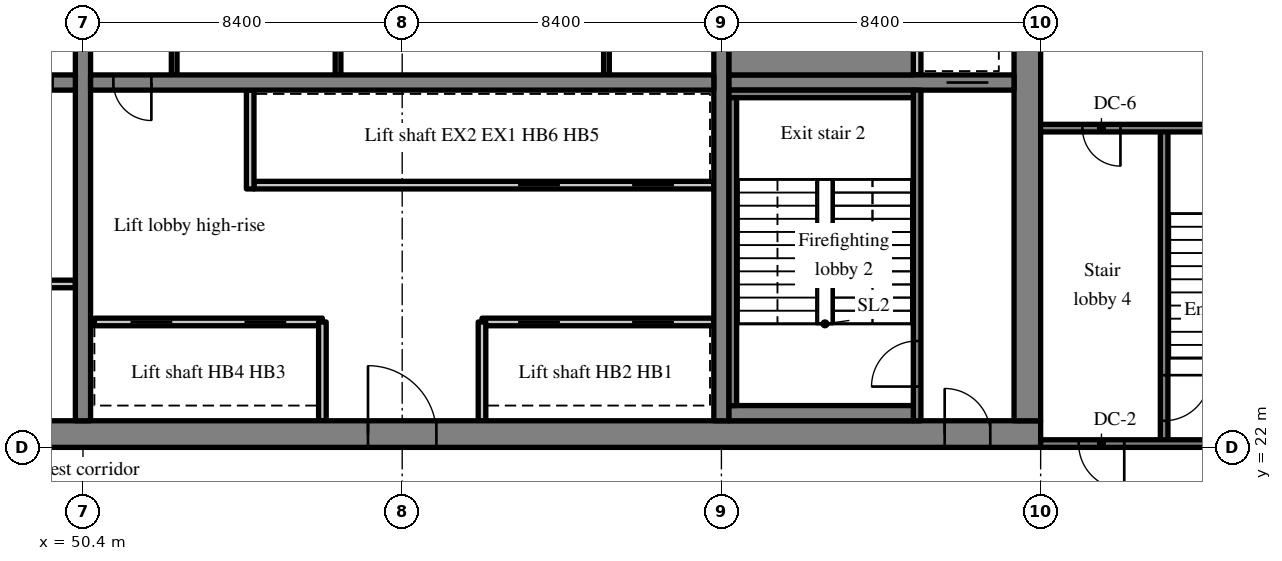
"""IFC4 building model, lengths in metres.
Left out: names, types, materials, properties, quantities, classifications, styles, units other than length and angle.
Written with IfcOpenShell. Run it as: python <this file> out.ifc"""

import sys

from ifc_helpers import new_model, si_unit, direction, frame, frame_2d, origin, place, context, subcontext, project, spatial, rectangle, extrude, source, transform, mapped, element, fill, save


model = new_model("IFC4")
c1 = context("Model", 3, precision=1e-05, world=origin(), true_north=direction((0.0, 1.0)))
c2 = subcontext(c1, "Body", "Model", "MODEL_VIEW")
j1 = project(units=[si_unit("LENGTHUNIT", "METRE"), si_unit("PLANEANGLEUNIT", "RADIAN")], contexts=[c1])
p1 = place(None, origin())
s1 = spatial("IfcSite", under=j1, at=p1, CompositionType="ELEMENT")
p2 = place(p1, origin())
s2 = spatial("IfcBuilding", under=s1, at=p2, CompositionType="ELEMENT")
p3 = place(p2, frame((0.0, 0.0, 163.0)))
s3 = spatial("IfcBuildingStorey", under=s2, at=p3, CompositionType="ELEMENT", Elevation=163.0)
m1 = source(origin(), c2, "Body", "SweptSolid", [
    extrude(rectangle(XDim=50.4, YDim=0.7, at=frame_2d((25.2, 0.0))), origin(), (0.0, 0.0, 1.0), 3.52),
])
p4 = place(p3, frame((25.2, 22.35, 0.0), z_axis=(0.0, 0.0, 1.0), x_axis=(1.0, 0.0, 0.0)))
e1 = element("IfcWall", 1, at=p4, inside=s3, PredefinedType="SHEAR", context=c2, shape_type="MappedRepresentation", body=[
    mapped(m1, transform((0.0, 0.0, 0.0), scale=1.0)),
])
m2 = source(origin(), c2, "Body", "SweptSolid", [
    extrude(rectangle(XDim=1.8, YDim=2.1, at=frame_2d((0.9, 1.05))), frame((0.0, 0.36, 0.0), z_axis=(0.0, -1.0, 0.0), x_axis=(1.0, 0.0, 0.0)), (0.0, 0.0, 1.0), 0.72),
])
p5 = place(p4, frame((15.9, 0.0, 0.0)))
e2 = element("IfcOpeningElement", 2, at=p5, cuts=e1, PredefinedType="OPENING", context=c2, shape_type="MappedRepresentation", body=[
    mapped(m2, transform((0.0, 0.0, 0.0), scale=1.0)),
])
m3 = source(origin(), c2, "Body", "SweptSolid", [
    extrude(rectangle(XDim=0.9, YDim=2.1, at=frame_2d((0.45, 1.05))), frame((0.0, 0.36, 0.0), z_axis=(0.0, -1.0, 0.0), x_axis=(1.0, 0.0, 0.0)), (0.0, 0.0, 1.0), 0.72),
])
p6 = place(p4, frame((9.7, 0.0, 0.0)))
e3 = element("IfcOpeningElement", 3, at=p6, cuts=e1, PredefinedType="OPENING", context=c2, shape_type="MappedRepresentation", body=[
    mapped(m3, transform((0.0, 0.0, 0.0), scale=1.0)),
])
p7 = place(p4, frame((21.5, 0.0, 0.0)))
e4 = element("IfcOpeningElement", 4, at=p7, cuts=e1, PredefinedType="OPENING", context=c2, shape_type="MappedRepresentation", body=[
    mapped(m3, transform((0.0, 0.0, 0.0), scale=1.0)),
])
p8 = place(p4, frame((32.7, 0.0, 0.0)))
e5 = element("IfcOpeningElement", 5, at=p8, cuts=e1, PredefinedType="OPENING", context=c2, shape_type="MappedRepresentation", body=[
    mapped(m2, transform((0.0, 0.0, 0.0), scale=1.0)),
])
m4 = source(origin(), c2, "Body", "SweptSolid", [
    extrude(rectangle(XDim=1.2, YDim=2.1, at=frame_2d((0.6, 1.05))), frame((0.0, 0.36, 0.0), z_axis=(0.0, -1.0, 0.0), x_axis=(1.0, 0.0, 0.0)), (0.0, 0.0, 1.0), 0.72),
])
p9 = place(p4, frame((6.475, 0.0, 0.0)))
e6 = element("IfcOpeningElement", 6, at=p9, cuts=e1, PredefinedType="OPENING", context=c2, shape_type="MappedRepresentation", body=[
    mapped(m4, transform((0.0, 0.0, 0.0), scale=1.0)),
])
p10 = place(p4, frame((47.875, 0.0, 0.0)))
e7 = element("IfcOpeningElement", 7, at=p10, cuts=e1, PredefinedType="OPENING", context=c2, shape_type="MappedRepresentation", body=[
    mapped(m4, transform((0.0, 0.0, 0.0), scale=1.0)),
])
m5 = source(origin(), c2, "Body", "SweptSolid", [
    extrude(rectangle(XDim=18.6, YDim=0.7, at=frame_2d((9.3, 0.0))), origin(), (0.0, 0.0, 1.0), 3.52),
])
p11 = place(p3, frame((75.25, 22.7, 0.0), z_axis=(0.0, 0.0, 1.0), x_axis=(0.0, 1.0, 0.0)))
e8 = element("IfcWall", 8, at=p11, inside=s3, PredefinedType="SHEAR", context=c2, shape_type="MappedRepresentation", body=[
    mapped(m5, transform((0.0, 0.0, 0.0), scale=1.0)),
])
p12 = place(p11, frame((12.7, 0.0, 0.0)))
e9 = element("IfcOpeningElement", 9, at=p12, cuts=e8, PredefinedType="OPENING", context=c2, shape_type="MappedRepresentation", body=[
    mapped(m4, transform((0.0, 0.0, 0.0), scale=1.0)),
])
m6 = source(origin(), c2, "Body", "SweptSolid", [
    extrude(rectangle(XDim=18.6, YDim=0.4, at=frame_2d((9.3, 0.0))), origin(), (0.0, 0.0, 1.0), 3.52),
])
p13 = place(p3, frame((50.4, 22.7, 0.0), z_axis=(0.0, 0.0, 1.0), x_axis=(0.0, 1.0, 0.0)))
e10 = element("IfcWall", 10, at=p13, inside=s3, PredefinedType="SHEAR", context=c2, shape_type="MappedRepresentation", body=[
    mapped(m6, transform((0.0, 0.0, 0.0), scale=1.0)),
])
m7 = source(origin(), c2, "Body", "SweptSolid", [
    extrude(rectangle(XDim=1.1, YDim=2.1, at=frame_2d((0.55, 1.05))), frame((0.0, 0.21, 0.0), z_axis=(0.0, -1.0, 0.0), x_axis=(1.0, 0.0, 0.0)), (0.0, 0.0, 1.0), 0.42),
])
p14 = place(p13, frame((12.75, 0.0, 0.0)))
e11 = element("IfcOpeningElement", 11, at=p14, cuts=e10, PredefinedType="OPENING", context=c2, shape_type="MappedRepresentation", body=[
    mapped(m7, transform((0.0, 0.0, 0.0), scale=1.0)),
])
p15 = place(p3, frame((67.2, 22.7, 0.0), z_axis=(0.0, 0.0, 1.0), x_axis=(0.0, 1.0, 0.0)))
e12 = element("IfcWall", 12, at=p15, inside=s3, PredefinedType="SHEAR", context=c2, shape_type="MappedRepresentation", body=[
    mapped(m6, transform((0.0, 0.0, 0.0), scale=1.0)),
])
m8 = source(origin(), c2, "Body", "SweptSolid", [
    extrude(rectangle(XDim=16.4, YDim=0.4, at=frame_2d((8.2, 0.0))), origin(), (0.0, 0.0, 1.0), 3.52),
])
p16 = place(p3, frame((33.8, 31.6, 0.0), z_axis=(0.0, 0.0, 1.0), x_axis=(1.0, 0.0, 0.0)))
e13 = element("IfcWall", 13, at=p16, inside=s3, PredefinedType="SHEAR", context=c2, shape_type="MappedRepresentation", body=[
    mapped(m8, transform((0.0, 0.0, 0.0), scale=1.0)),
])
m9 = source(origin(), c2, "Body", "SweptSolid", [
    extrude(rectangle(XDim=1.0, YDim=2.1, at=frame_2d((0.5, 1.05))), frame((0.0, 0.21, 0.0), z_axis=(0.0, -1.0, 0.0), x_axis=(1.0, 0.0, 0.0)), (0.0, 0.0, 1.0), 0.42),
])
p17 = place(p16, frame((14.8, 0.0, 0.0)))
e14 = element("IfcOpeningElement", 14, at=p17, cuts=e13, PredefinedType="OPENING", context=c2, shape_type="MappedRepresentation", body=[
    mapped(m9, transform((0.0, 0.0, 0.0), scale=1.0)),
])
p18 = place(p3, frame((50.6, 31.6, 0.0), z_axis=(0.0, 0.0, 1.0), x_axis=(1.0, 0.0, 0.0)))
e15 = element("IfcWall", 15, at=p18, inside=s3, PredefinedType="SHEAR", context=c2, shape_type="MappedRepresentation", body=[
    mapped(m8, transform((0.0, 0.0, 0.0), scale=1.0)),
])
p19 = place(p18, frame((0.6, 0.0, 0.0)))
e16 = element("IfcOpeningElement", 16, at=p19, cuts=e15, PredefinedType="OPENING", context=c2, shape_type="MappedRepresentation", body=[
    mapped(m9, transform((0.0, 0.0, 0.0), scale=1.0)),
])
m10 = source(origin(), c2, "Body", "SweptSolid", [
    extrude(rectangle(XDim=7.5, YDim=0.4, at=frame_2d((3.75, 0.0))), origin(), (0.0, 0.0, 1.0), 3.52),
])
p20 = place(p3, frame((67.4, 31.6, 0.0), z_axis=(0.0, 0.0, 1.0), x_axis=(1.0, 0.0, 0.0)))
e17 = element("IfcWall", 17, at=p20, inside=s3, PredefinedType="SHEAR", context=c2, shape_type="MappedRepresentation", body=[
    mapped(m10, transform((0.0, 0.0, 0.0), scale=1.0)),
])
p21 = place(p20, frame((5.725, 0.0, 0.0)))
e18 = element("IfcOpeningElement", 18, at=p21, cuts=e17, PredefinedType="OPENING", context=c2, shape_type="MappedRepresentation", body=[
    mapped(m7, transform((0.0, 0.0, 0.0), scale=1.0)),
])
m11 = source(origin(), c2, "Body", "SweptSolid", [
    extrude(rectangle(XDim=6.1, YDim=0.2, at=frame_2d((3.05, 0.0))), origin(), (0.0, 0.0, 1.0), 3.52),
])
p22 = place(p3, frame((44.1, 26.3, 0.0), z_axis=(0.0, 0.0, 1.0), x_axis=(1.0, 0.0, 0.0)))
e19 = element("IfcWall", 19, at=p22, inside=s3, PredefinedType="PARTITIONING", context=c2, shape_type="MappedRepresentation", body=[
    mapped(m11, transform((0.0, 0.0, 0.0), scale=1.0)),
])
m12 = source(origin(), c2, "Body", "SweptSolid", [
    extrude(rectangle(XDim=6.1, YDim=0.2, at=frame_2d((3.05, 0.0))), origin(), (0.0, 0.0, 1.0), 3.52),
])
p23 = place(p3, frame((67.0, 25.3, 0.0), z_axis=(0.0, 0.0, 1.0), x_axis=(-1.0, 0.0, 0.0)))
e20 = element("IfcWall", 20, at=p23, inside=s3, PredefinedType="SOLIDWALL", context=c2, shape_type="MappedRepresentation", body=[
    mapped(m12, transform((0.0, 0.0, 0.0), scale=1.0)),
])
m13 = source(origin(), c2, "Body", "SweptSolid", [
    extrude(rectangle(XDim=1.1, YDim=2.1, at=frame_2d((0.55, 1.05))), frame((0.0, 0.11, 0.0), z_axis=(0.0, -1.0, 0.0), x_axis=(1.0, 0.0, 0.0)), (0.0, 0.0, 1.0), 0.22),
])
p24 = place(p23, frame((1.05, 0.0, 0.0)))
e21 = element("IfcOpeningElement", 21, at=p24, cuts=e20, PredefinedType="OPENING", context=c2, shape_type="MappedRepresentation", body=[
    mapped(m13, transform((0.0, 0.0, 0.0), scale=1.0)),
])
p25 = place(p23, frame((4.05, 0.0, 0.0)))
e22 = element("IfcOpeningElement", 22, at=p25, cuts=e20, PredefinedType="OPENING", context=c2, shape_type="MappedRepresentation", body=[
    mapped(m13, transform((0.0, 0.0, 0.0), scale=1.0)),
])
m14 = source(origin(), c2, "Body", "SweptSolid", [
    extrude(rectangle(XDim=6.0, YDim=0.2, at=frame_2d((3.0, 0.0))), origin(), (0.0, 0.0, 1.0), 3.52),
])
p26 = place(p3, frame((56.7, 25.3, 0.0), z_axis=(0.0, 0.0, 1.0), x_axis=(-1.0, 0.0, 0.0)))
e23 = element("IfcWall", 23, at=p26, inside=s3, PredefinedType="SOLIDWALL", context=c2, shape_type="MappedRepresentation", body=[
    mapped(m14, transform((0.0, 0.0, 0.0), scale=1.0)),
])
p27 = place(p26, frame((0.95, 0.0, 0.0)))
e24 = element("IfcOpeningElement", 24, at=p27, cuts=e23, PredefinedType="OPENING", context=c2, shape_type="MappedRepresentation", body=[
    mapped(m13, transform((0.0, 0.0, 0.0), scale=1.0)),
])
p28 = place(p26, frame((3.95, 0.0, 0.0)))
e25 = element("IfcOpeningElement", 25, at=p28, cuts=e23, PredefinedType="OPENING", context=c2, shape_type="MappedRepresentation", body=[
    mapped(m13, transform((0.0, 0.0, 0.0), scale=1.0)),
])
m15 = source(origin(), c2, "Body", "SweptSolid", [
    extrude(rectangle(XDim=12.1, YDim=0.2, at=frame_2d((6.05, 0.0))), origin(), (0.0, 0.0, 1.0), 3.52),
])
p29 = place(p3, frame((67.0, 28.9, 0.0), z_axis=(0.0, 0.0, 1.0), x_axis=(-1.0, 0.0, 0.0)))
e26 = element("IfcWall", 26, at=p29, inside=s3, PredefinedType="SOLIDWALL", context=c2, shape_type="MappedRepresentation", body=[
    mapped(m15, transform((0.0, 0.0, 0.0), scale=1.0)),
])
p30 = place(p29, frame((1.05, 0.0, 0.0)))
e27 = element("IfcOpeningElement", 27, at=p30, cuts=e26, PredefinedType="OPENING", context=c2, shape_type="MappedRepresentation", body=[
    mapped(m13, transform((0.0, 0.0, 0.0), scale=1.0)),
])
p31 = place(p29, frame((4.05, 0.0, 0.0)))
e28 = element("IfcOpeningElement", 28, at=p31, cuts=e26, PredefinedType="OPENING", context=c2, shape_type="MappedRepresentation", body=[
    mapped(m13, transform((0.0, 0.0, 0.0), scale=1.0)),
])
m16 = source(origin(), c2, "Body", "SweptSolid", [
    extrude(rectangle(XDim=2.6, YDim=0.2, at=frame_2d((1.3, 0.0))), origin(), (0.0, 0.0, 1.0), 3.52),
])
for number, where, z_axis, x_axis in (
    (29, (60.9, 22.7, 0.0), (0.0, 0.0, 1.0), (0.0, 1.0, 0.0)),
    (30, (56.7, 22.7, 0.0), (0.0, 0.0, 1.0), (0.0, 1.0, 0.0)),
):
    element("IfcWall", number, at=place(p3, frame(where, z_axis=z_axis, x_axis=x_axis)), inside=s3, PredefinedType="SOLIDWALL", context=c2, shape_type="MappedRepresentation", body=[
        mapped(m16, transform((0.0, 0.0, 0.0), scale=1.0)),
    ])
m17 = source(origin(), c2, "Body", "SweptSolid", [
    extrude(rectangle(XDim=2.6, YDim=0.2, at=frame_2d((1.3, 0.0))), origin(), (0.0, 0.0, 1.0), 3.52),
])
p32 = place(p3, frame((54.8, 28.8, 0.0), z_axis=(0.0, 0.0, 1.0), x_axis=(0.0, 1.0, 0.0)))
e31 = element("IfcWall", 31, at=p32, inside=s3, PredefinedType="SOLIDWALL", context=c2, shape_type="MappedRepresentation", body=[
    mapped(m17, transform((0.0, 0.0, 0.0), scale=1.0)),
])
m18 = source(origin(), c2, "Body", "SweptSolid", [
    extrude(rectangle(XDim=3.2, YDim=0.15, at=frame_2d((1.6, 0.0))), origin(), (0.0, 0.0, 1.0), 3.52),
])
for number, where, z_axis, x_axis in (
    (32, (52.8, 31.8, 0.0), (0.0, 0.0, 1.0), (0.0, 1.0, 0.0)),
    (33, (64.175, 31.8, 0.0), (0.0, 0.0, 1.0), (0.0, 1.0, 0.0)),
    (34, (57.112, 31.8, 0.0), (0.0, 0.0, 1.0), (0.0, 1.0, 0.0)),
):
    element("IfcWall", number, at=place(p3, frame(where, z_axis=z_axis, x_axis=x_axis)), inside=s3, PredefinedType="PARTITIONING", context=c2, shape_type="MappedRepresentation", body=[
        mapped(m18, transform((0.0, 0.0, 0.0), scale=1.0)),
    ])
m19 = source(origin(), c2, "Body", "SweptSolid", [
    extrude(rectangle(XDim=8.7, YDim=0.2, at=frame_2d((4.35, 0.0))), origin(), (0.0, 0.0, 1.0), 3.52),
])
p33 = place(p3, frame((72.35, 22.7, 0.0), z_axis=(0.0, 0.0, 1.0), x_axis=(0.0, 1.0, 0.0)))
e35 = element("IfcWall", 35, at=p33, inside=s3, PredefinedType="SOLIDWALL", context=c2, shape_type="MappedRepresentation", body=[
    mapped(m19, transform((0.0, 0.0, 0.0), scale=1.0)),
])
m20 = source(origin(), c2, "Body", "SweptSolid", [
    extrude(rectangle(XDim=1.2, YDim=2.1, at=frame_2d((0.6, 1.05))), frame((0.0, 0.11, 0.0), z_axis=(0.0, -1.0, 0.0), x_axis=(1.0, 0.0, 0.0)), (0.0, 0.0, 1.0), 0.22),
])
p34 = place(p33, frame((0.9, 0.0, 0.0)))
e36 = element("IfcOpeningElement", 36, at=p34, cuts=e35, PredefinedType="OPENING", context=c2, shape_type="MappedRepresentation", body=[
    mapped(m20, transform((0.0, 0.0, 0.0), scale=1.0)),
])
m21 = source(origin(), c2, "Body", "SweptSolid", [
    extrude(rectangle(XDim=1.8, YDim=0.2, at=frame_2d((0.9, 0.0))), origin(), (0.0, 0.0, 1.0), 3.52),
])
p35 = place(p3, frame((72.35, 31.8, 0.0), z_axis=(0.0, 0.0, 1.0), x_axis=(0.0, 1.0, 0.0)))
e37 = element("IfcWall", 37, at=p35, inside=s3, PredefinedType="SOLIDWALL", context=c2, shape_type="MappedRepresentation", body=[
    mapped(m21, transform((0.0, 0.0, 0.0), scale=1.0)),
])
m22 = source(origin(), c2, "Body", "SweptSolid", [
    extrude(rectangle(XDim=8.3, YDim=0.2, at=frame_2d((4.15, 0.0))), origin(), (0.0, 0.0, 1.0), 3.52),
])
p36 = place(p3, frame((78.85, 22.1, 0.0), z_axis=(0.0, 0.0, 1.0), x_axis=(0.0, 1.0, 0.0)))
e38 = element("IfcWall", 38, at=p36, inside=s3, PredefinedType="SOLIDWALL", context=c2, shape_type="MappedRepresentation", body=[
    mapped(m22, transform((0.0, 0.0, 0.0), scale=1.0)),
])
p37 = place(p36, frame((0.6, 0.0, 0.0)))
e39 = element("IfcOpeningElement", 39, at=p37, cuts=e38, PredefinedType="OPENING", context=c2, shape_type="MappedRepresentation", body=[
    mapped(m20, transform((0.0, 0.0, 0.0), scale=1.0)),
])
m23 = source(origin(), c2, "Body", "SweptSolid", [
    extrude(rectangle(XDim=8.25, YDim=0.2, at=frame_2d((4.125, 0.0))), origin(), (0.0, 0.0, 1.0), 3.52),
])
p38 = place(p3, frame((83.85, 22.1, 0.0), z_axis=(0.0, 0.0, 1.0), x_axis=(-1.0, 0.0, 0.0)))
e40 = element("IfcWall", 40, at=p38, inside=s3, PredefinedType="SOLIDWALL", context=c2, shape_type="MappedRepresentation", body=[
    mapped(m23, transform((0.0, 0.0, 0.0), scale=1.0)),
])
p39 = place(p38, frame((6.05, 0.0, 0.0)))
e41 = element("IfcOpeningElement", 41, at=p39, cuts=e40, PredefinedType="OPENING", context=c2, shape_type="MappedRepresentation", body=[
    mapped(m20, transform((0.0, 0.0, 0.0), scale=1.0)),
])
p40 = place(p3, frame((83.85, 30.4, 0.0), z_axis=(0.0, 0.0, 1.0), x_axis=(-1.0, 0.0, 0.0)))
e42 = element("IfcWall", 42, at=p40, inside=s3, PredefinedType="SOLIDWALL", context=c2, shape_type="MappedRepresentation", body=[
    mapped(m23, transform((0.0, 0.0, 0.0), scale=1.0)),
])
m24 = source(origin(), c2, "Body", "SweptSolid", [
    extrude(rectangle(XDim=1.0, YDim=2.1, at=frame_2d((0.5, 1.05))), frame((0.0, 0.11, 0.0), z_axis=(0.0, -1.0, 0.0), x_axis=(1.0, 0.0, 0.0)), (0.0, 0.0, 1.0), 0.22),
])
p41 = place(p40, frame((6.15, 0.0, 0.0)))
e43 = element("IfcOpeningElement", 43, at=p41, cuts=e42, PredefinedType="OPENING", context=c2, shape_type="MappedRepresentation", body=[
    mapped(m24, transform((0.0, 0.0, 0.0), scale=1.0)),
])
m25 = source(origin(), c2, "Body", "SweptSolid", [
    extrude(rectangle(XDim=4.85, YDim=0.4, at=frame_2d((2.425, 0.0))), origin(), (0.0, 0.0, 1.0), 3.52),
])
p42 = place(p3, frame((67.4, 22.9, 0.0), z_axis=(0.0, 0.0, 1.0), x_axis=(1.0, 0.0, 0.0)))
e44 = element("IfcWall", 44, at=p42, inside=s3, PredefinedType="SOLIDWALL", context=c2, shape_type="MappedRepresentation", body=[
    mapped(m25, transform((0.0, 0.0, 0.0), scale=1.0)),
])
m26 = source(origin(), c2, "Body", "SweptSolid", [
    extrude(rectangle(XDim=4.85, YDim=0.2, at=frame_2d((2.425, 0.0))), origin(), (0.0, 0.0, 1.0), 3.52),
])
p43 = place(p3, frame((67.4, 31.3, 0.0), z_axis=(0.0, 0.0, 1.0), x_axis=(1.0, 0.0, 0.0)))
e45 = element("IfcWall", 45, at=p43, inside=s3, PredefinedType="SOLIDWALL", context=c2, shape_type="MappedRepresentation", body=[
    mapped(m26, transform((0.0, 0.0, 0.0), scale=1.0)),
])
m27 = source(origin(), c2, "Body", "SweptSolid", [
    extrude(rectangle(XDim=8.1, YDim=0.2, at=frame_2d((4.05, 0.0))), origin(), (0.0, 0.0, 1.0), 3.52),
])
p44 = place(p3, frame((67.5, 23.1, 0.0), z_axis=(0.0, 0.0, 1.0), x_axis=(0.0, 1.0, 0.0)))
e46 = element("IfcWall", 46, at=p44, inside=s3, PredefinedType="SOLIDWALL", context=c2, shape_type="MappedRepresentation", body=[
    mapped(m27, transform((0.0, 0.0, 0.0), scale=1.0)),
])
m28 = source(origin(), c2, "Body", "SweptSolid", [
    extrude(rectangle(XDim=4.85, YDim=1.0, at=frame_2d((2.425, 0.0))), origin(), (0.0, 0.0, 1.0), 3.52),
])
p45 = place(p3, frame((67.4, 32.3, 0.0), z_axis=(0.0, 0.0, 1.0), x_axis=(1.0, 0.0, 0.0)))
e47 = element("IfcWall", 47, at=p45, inside=s3, PredefinedType="SOLIDWALL", context=c2, shape_type="MappedRepresentation", body=[
    mapped(m28, transform((0.0, 0.0, 0.0), scale=1.0)),
])
m29 = source(origin(), c2, "Body", "SweptSolid", [
    extrude(rectangle(XDim=1.8, YDim=2.1, at=frame_2d((0.9, 1.05))), frame((0.0, 0.275, 0.0), z_axis=(0.0, -1.0, 0.0), x_axis=(1.0, 0.0, 0.0)), (0.0, 0.0, 1.0), 0.05),
])
p46 = place(p8, origin())
e48 = element("IfcDoor", 48, at=p46, inside=s3, OperationType="DOUBLE_DOOR_SINGLE_SWING", PredefinedType="DOOR", context=c2, shape_type="MappedRepresentation", body=[
    mapped(m29, transform((0.0, 0.0, 0.0), scale=1.0)),
])
fill(e5, e48)
m30 = source(origin(), c2, "Body", "SweptSolid", [
    extrude(rectangle(XDim=1.0, YDim=2.1, at=frame_2d((0.5, 1.05))), frame((0.0, 0.025, 0.0), z_axis=(0.0, -1.0, 0.0), x_axis=(1.0, 0.0, 0.0)), (0.0, 0.0, 1.0), 0.05),
])
p47 = place(p19, origin())
e49 = element("IfcDoor", 49, at=p47, inside=s3, OperationType="SINGLE_SWING_RIGHT", PredefinedType="DOOR", context=c2, shape_type="MappedRepresentation", body=[
    mapped(m30, transform((0.0, 0.0, 0.0), scale=1.0)),
])
fill(e16, e49)
m31 = source(origin(), c2, "Body", "SweptSolid", [
    extrude(rectangle(XDim=1.1, YDim=2.1, at=frame_2d((0.55, 1.05))), frame((0.0, 0.025, 0.0), z_axis=(0.0, -1.0, 0.0), x_axis=(1.0, 0.0, 0.0)), (0.0, 0.0, 1.0), 0.05),
])
p48 = place(p24, origin())
e50 = element("IfcDoor", 50, at=p48, inside=s3, OperationType="SLIDING_TO_RIGHT", PredefinedType="DOOR", context=c2, shape_type="MappedRepresentation", body=[
    mapped(m31, transform((0.0, 0.0, 0.0), scale=1.0)),
])
fill(e21, e50)
p49 = place(p25, origin())
e51 = element("IfcDoor", 51, at=p49, inside=s3, OperationType="SLIDING_TO_LEFT", PredefinedType="DOOR", context=c2, shape_type="MappedRepresentation", body=[
    mapped(m31, transform((0.0, 0.0, 0.0), scale=1.0)),
])
fill(e22, e51)
p50 = place(p27, origin())
e52 = element("IfcDoor", 52, at=p50, inside=s3, OperationType="SLIDING_TO_RIGHT", PredefinedType="DOOR", context=c2, shape_type="MappedRepresentation", body=[
    mapped(m31, transform((0.0, 0.0, 0.0), scale=1.0)),
])
fill(e24, e52)
p51 = place(p28, origin())
e53 = element("IfcDoor", 53, at=p51, inside=s3, OperationType="SLIDING_TO_LEFT", PredefinedType="DOOR", context=c2, shape_type="MappedRepresentation", body=[
    mapped(m31, transform((0.0, 0.0, 0.0), scale=1.0)),
])
fill(e25, e53)
p52 = place(p30, origin())
e54 = element("IfcDoor", 54, at=p52, inside=s3, OperationType="SLIDING_TO_RIGHT", PredefinedType="DOOR", context=c2, shape_type="MappedRepresentation", body=[
    mapped(m31, transform((0.0, 0.0, 0.0), scale=1.0)),
])
fill(e27, e54)
p53 = place(p31, origin())
e55 = element("IfcDoor", 55, at=p53, inside=s3, OperationType="SLIDING_TO_LEFT", PredefinedType="DOOR", context=c2, shape_type="MappedRepresentation", body=[
    mapped(m31, transform((0.0, 0.0, 0.0), scale=1.0)),
])
fill(e28, e55)
m32 = source(origin(), c2, "Body", "SweptSolid", [
    extrude(rectangle(XDim=1.2, YDim=2.1, at=frame_2d((0.6, 1.05))), frame((0.0, 0.025, 0.0), z_axis=(0.0, -1.0, 0.0), x_axis=(1.0, 0.0, 0.0)), (0.0, 0.0, 1.0), 0.05),
])
p54 = place(p34, origin())
e56 = element("IfcDoor", 56, at=p54, inside=s3, OperationType="SINGLE_SWING_LEFT", PredefinedType="DOOR", context=c2, shape_type="MappedRepresentation", body=[
    mapped(m32, transform((0.0, 0.0, 0.0), scale=1.0)),
])
fill(e36, e56)
m33 = source(origin(), c2, "Body", "SweptSolid", [
    extrude(rectangle(XDim=1.2, YDim=2.1, at=frame_2d((0.6, 1.05))), frame((0.0, 0.275, 0.0), z_axis=(0.0, -1.0, 0.0), x_axis=(1.0, 0.0, 0.0)), (0.0, 0.0, 1.0), 0.05),
])
p55 = place(p10, origin())
e57 = element("IfcDoor", 57, at=p55, inside=s3, OperationType="SINGLE_SWING_LEFT", PredefinedType="DOOR", context=c2, shape_type="MappedRepresentation", body=[
    mapped(m33, transform((0.0, 0.0, 0.0), scale=1.0)),
])
fill(e7, e57)
p56 = place(p21, origin())
e58 = element("IfcDoor", 58, at=p56, inside=s3, OperationType="SLIDING_TO_LEFT", PredefinedType="DOOR", context=c2, shape_type="MappedRepresentation", body=[
    mapped(m31, transform((0.0, 0.0, 0.0), scale=1.0)),
])
fill(e18, e58)
p57 = place(p37, origin())
e59 = element("IfcDoor", 59, at=p57, inside=s3, OperationType="SINGLE_SWING_RIGHT", PredefinedType="DOOR", context=c2, shape_type="MappedRepresentation", body=[
    mapped(m32, transform((0.0, 0.0, 0.0), scale=1.0)),
])
fill(e39, e59)
p58 = place(p39, origin())
e60 = element("IfcDoor", 60, at=p58, inside=s3, OperationType="SINGLE_SWING_LEFT", PredefinedType="DOOR", context=c2, shape_type="MappedRepresentation", body=[
    mapped(m32, transform((0.0, 0.0, 0.0), scale=1.0)),
])
fill(e41, e60)
p59 = place(p41, origin())
e61 = element("IfcDoor", 61, at=p59, inside=s3, OperationType="SINGLE_SWING_LEFT", PredefinedType="DOOR", context=c2, shape_type="MappedRepresentation", body=[
    mapped(m30, transform((0.0, 0.0, 0.0), scale=1.0)),
])
fill(e43, e61)
save(model, sys.argv[1])
